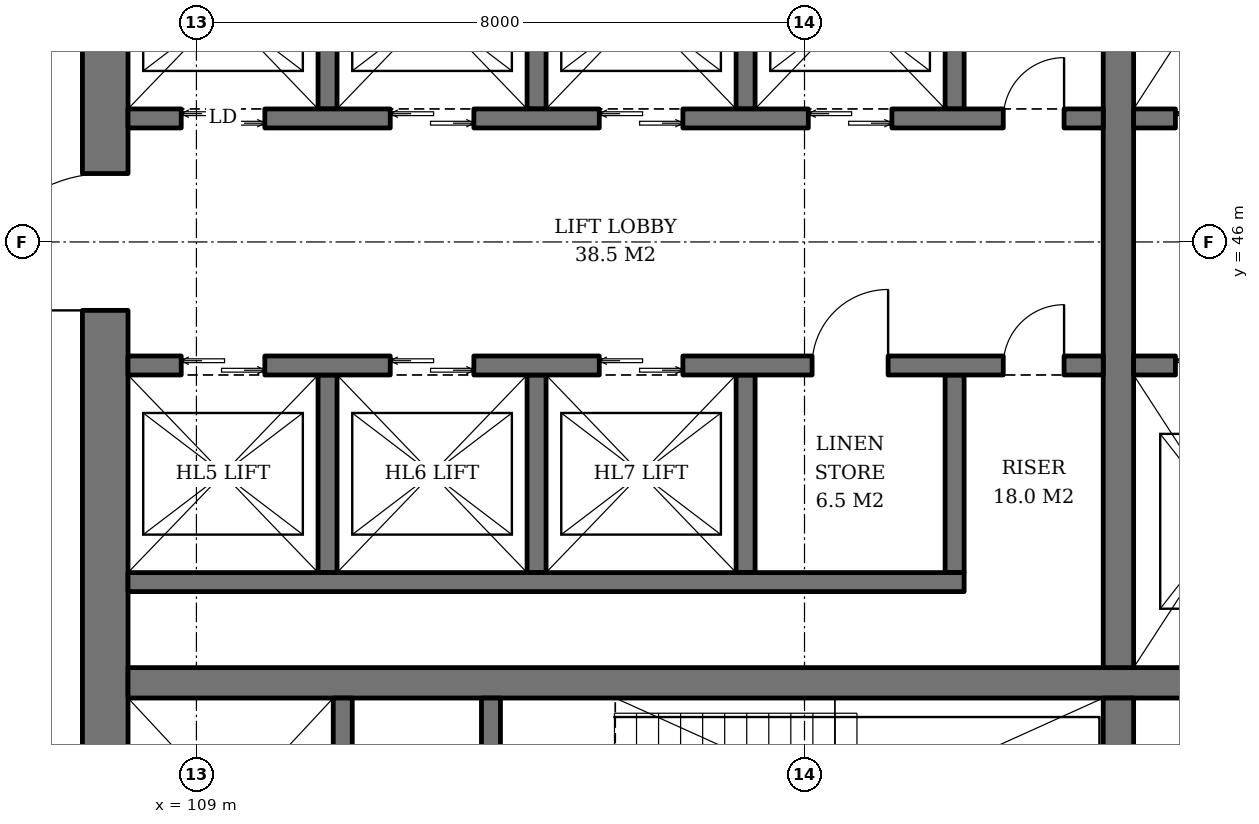
"""IFC4 building model, lengths in metres.
Left out: names, types, materials, properties, quantities, classifications, styles, units other than length and angle.
Written with IfcOpenShell. Run it as: python <this file> out.ifc"""

import sys

from ifc_helpers import new_model, si_unit, direction, frame, frame_2d, origin, place, context, subcontext, project, spatial, rectangle, extrude, element, fill, save


model = new_model("IFC4")
c1 = context("Model", 3, precision=1e-05, world=origin(), true_north=direction((0.0, 1.0)))
c2 = subcontext(c1, "Body", "Model", "MODEL_VIEW")
j1 = project(units=[si_unit("LENGTHUNIT", "METRE"), si_unit("PLANEANGLEUNIT", "RADIAN")], contexts=[c1])
p1 = place(None, origin())
s1 = spatial("IfcSite", under=j1, at=p1, CompositionType="ELEMENT")
p2 = place(p1, origin())
s2 = spatial("IfcBuilding", under=s1, at=p2, CompositionType="ELEMENT")
p3 = place(p2, frame((0.0, 0.0, 116.0)))
s3 = spatial("IfcBuildingStorey", under=s2, at=p3, CompositionType="ELEMENT", Elevation=116.0)
p4 = place(p3, frame((107.8, 37.1, 0.0), z_axis=(0.0, 0.0, 1.0), x_axis=(0.0, 1.0, 0.0)))
e1 = element("IfcWall", 1, at=p4, inside=s3, PredefinedType="SHEAR", context=c2, shape_type="SweptSolid", body=[
    extrude(rectangle(XDim=17.8, YDim=0.6, at=frame_2d((8.9, 0.0))), origin(), (0.0, 0.0, 1.0), 3.8),
])
p5 = place(p4, frame((8.0, 0.0, 0.0)))
e2 = element("IfcOpeningElement", 2, at=p5, cuts=e1, PredefinedType="OPENING", context=c2, shape_type="SweptSolid", body=[
    extrude(rectangle(XDim=1.8, YDim=2.4, at=frame_2d((0.9, 1.2))), frame((0.0, 0.31, 0.0), z_axis=(0.0, -1.0, 0.0), x_axis=(1.0, 0.0, 0.0)), (0.0, 0.0, 1.0), 0.62),
])
p6 = place(p3, frame((108.1, 40.2, 0.0), z_axis=(0.0, 0.0, 1.0), x_axis=(1.0, 0.0, 0.0)))
e3 = element("IfcWall", 3, at=p6, inside=s3, PredefinedType="SHEAR", context=c2, shape_type="SweptSolid", body=[
    extrude(rectangle(XDim=17.8, YDim=0.4, at=frame_2d((8.9, 0.0))), origin(), (0.0, 0.0, 1.0), 3.8),
])
p7 = place(p3, frame((121.13, 37.1, 0.0), z_axis=(0.0, 0.0, 1.0), x_axis=(0.0, 1.0, 0.0)))
e4 = element("IfcWall", 4, at=p7, inside=s3, PredefinedType="SHEAR", context=c2, shape_type="SweptSolid", body=[
    extrude(rectangle(XDim=2.9, YDim=0.4, at=frame_2d((1.45, 0.0))), origin(), (0.0, 0.0, 1.0), 3.8),
])
p8 = place(p3, frame((121.13, 40.4, 0.0), z_axis=(0.0, 0.0, 1.0), x_axis=(0.0, 1.0, 0.0)))
e5 = element("IfcWall", 5, at=p8, inside=s3, PredefinedType="SHEAR", context=c2, shape_type="SweptSolid", body=[
    extrude(rectangle(XDim=11.2, YDim=0.4, at=frame_2d((5.6, 0.0))), origin(), (0.0, 0.0, 1.0), 3.8),
])
p9 = place(p3, frame((110.925, 37.1, 0.0), z_axis=(0.0, 0.0, 1.0), x_axis=(0.0, 1.0, 0.0)))
e6 = element("IfcWall", 6, at=p9, inside=s3, PredefinedType="SHEAR", context=c2, shape_type="SweptSolid", body=[
    extrude(rectangle(XDim=2.9, YDim=0.25, at=frame_2d((1.45, 0.0))), origin(), (0.0, 0.0, 1.0), 3.8),
])
p10 = place(p9, frame((0.8, 0.0, 0.0)))
e7 = element("IfcOpeningElement", 7, at=p10, cuts=e6, PredefinedType="OPENING", context=c2, shape_type="SweptSolid", body=[
    extrude(rectangle(XDim=1.3, YDim=2.2, at=frame_2d((0.65, 1.1))), frame((0.0, 0.135, 0.0), z_axis=(0.0, -1.0, 0.0), x_axis=(1.0, 0.0, 0.0)), (0.0, 0.0, 1.0), 0.27),
])
p11 = place(p3, frame((112.875, 37.1, 0.0), z_axis=(0.0, 0.0, 1.0), x_axis=(0.0, 1.0, 0.0)))
e8 = element("IfcWall", 8, at=p11, inside=s3, PredefinedType="SHEAR", context=c2, shape_type="SweptSolid", body=[
    extrude(rectangle(XDim=2.9, YDim=0.25, at=frame_2d((1.45, 0.0))), origin(), (0.0, 0.0, 1.0), 3.8),
])
p12 = place(p11, frame((0.75, 0.0, 0.0)))
e9 = element("IfcOpeningElement", 9, at=p12, cuts=e8, PredefinedType="OPENING", context=c2, shape_type="SweptSolid", body=[
    extrude(rectangle(XDim=1.2, YDim=2.1, at=frame_2d((0.6, 1.05))), frame((0.0, 0.135, 0.0), z_axis=(0.0, -1.0, 0.0), x_axis=(1.0, 0.0, 0.0)), (0.0, 0.0, 1.0), 0.27),
])
for number, where, z_axis, x_axis in (
    (10, (110.725, 47.75, 0.0), (0.0, 0.0, 1.0), (0.0, 1.0, 0.0)),
    (11, (113.475, 47.75, 0.0), (0.0, 0.0, 1.0), (0.0, 1.0, 0.0)),
    (12, (116.225, 47.75, 0.0), (0.0, 0.0, 1.0), (0.0, 1.0, 0.0)),
    (13, (118.975, 47.75, 0.0), (0.0, 0.0, 1.0), (0.0, 1.0, 0.0)),
):
    element("IfcWall", number, at=place(p3, frame(where, z_axis=z_axis, x_axis=x_axis)), inside=s3, PredefinedType="SHEAR", context=c2, shape_type="SweptSolid", body=[
        extrude(rectangle(XDim=2.6, YDim=0.25, at=frame_2d((1.3, 0.0))), origin(), (0.0, 0.0, 1.0), 3.8),
    ])
p13 = place(p3, frame((108.1, 47.625, 0.0), z_axis=(0.0, 0.0, 1.0), x_axis=(1.0, 0.0, 0.0)))
e14 = element("IfcWall", 14, at=p13, inside=s3, PredefinedType="SHEAR", context=c2, shape_type="SweptSolid", body=[
    extrude(rectangle(XDim=12.83, YDim=0.25, at=frame_2d((6.415, 0.0))), origin(), (0.0, 0.0, 1.0), 3.8),
])
p14 = place(p13, frame((0.7, 0.0, 0.0)))
e15 = element("IfcOpeningElement", 15, at=p14, cuts=e14, PredefinedType="OPENING", context=c2, shape_type="SweptSolid", body=[
    extrude(rectangle(XDim=1.1, YDim=2.2, at=frame_2d((0.55, 1.1))), frame((0.0, 0.135, 0.0), z_axis=(0.0, -1.0, 0.0), x_axis=(1.0, 0.0, 0.0)), (0.0, 0.0, 1.0), 0.27),
])
p15 = place(p13, frame((3.45, 0.0, 0.0)))
e16 = element("IfcOpeningElement", 16, at=p15, cuts=e14, PredefinedType="OPENING", context=c2, shape_type="SweptSolid", body=[
    extrude(rectangle(XDim=1.1, YDim=2.2, at=frame_2d((0.55, 1.1))), frame((0.0, 0.135, 0.0), z_axis=(0.0, -1.0, 0.0), x_axis=(1.0, 0.0, 0.0)), (0.0, 0.0, 1.0), 0.27),
])
p16 = place(p13, frame((6.2, 0.0, 0.0)))
e17 = element("IfcOpeningElement", 17, at=p16, cuts=e14, PredefinedType="OPENING", context=c2, shape_type="SweptSolid", body=[
    extrude(rectangle(XDim=1.1, YDim=2.2, at=frame_2d((0.55, 1.1))), frame((0.0, 0.135, 0.0), z_axis=(0.0, -1.0, 0.0), x_axis=(1.0, 0.0, 0.0)), (0.0, 0.0, 1.0), 0.27),
])
p17 = place(p13, frame((8.95, 0.0, 0.0)))
e18 = element("IfcOpeningElement", 18, at=p17, cuts=e14, PredefinedType="OPENING", context=c2, shape_type="SweptSolid", body=[
    extrude(rectangle(XDim=1.1, YDim=2.2, at=frame_2d((0.55, 1.1))), frame((0.0, 0.135, 0.0), z_axis=(0.0, -1.0, 0.0), x_axis=(1.0, 0.0, 0.0)), (0.0, 0.0, 1.0), 0.27),
])
p18 = place(p13, frame((11.515, 0.0, 0.0)))
e19 = element("IfcOpeningElement", 19, at=p18, cuts=e14, PredefinedType="OPENING", context=c2, shape_type="SweptSolid", body=[
    extrude(rectangle(XDim=0.8, YDim=2.0, at=frame_2d((0.4, 1.0))), frame((0.0, 0.135, 0.0), z_axis=(0.0, -1.0, 0.0), x_axis=(1.0, 0.0, 0.0)), (0.0, 0.0, 1.0), 0.27),
])
for number, where, z_axis, x_axis in (
    (20, (110.725, 44.25, 0.0), (0.0, 0.0, 1.0), (0.0, -1.0, 0.0)),
    (21, (113.475, 44.25, 0.0), (0.0, 0.0, 1.0), (0.0, -1.0, 0.0)),
    (22, (116.225, 44.25, 0.0), (0.0, 0.0, 1.0), (0.0, -1.0, 0.0)),
    (23, (118.975, 44.25, 0.0), (0.0, 0.0, 1.0), (0.0, -1.0, 0.0)),
):
    element("IfcWall", number, at=place(p3, frame(where, z_axis=z_axis, x_axis=x_axis)), inside=s3, PredefinedType="SHEAR", context=c2, shape_type="SweptSolid", body=[
        extrude(rectangle(XDim=2.6, YDim=0.25, at=frame_2d((1.3, 0.0))), origin(), (0.0, 0.0, 1.0), 3.8),
    ])
p19 = place(p3, frame((108.1, 41.525, 0.0), z_axis=(0.0, 0.0, 1.0), x_axis=(1.0, 0.0, 0.0)))
e24 = element("IfcWall", 24, at=p19, inside=s3, PredefinedType="SHEAR", context=c2, shape_type="SweptSolid", body=[
    extrude(rectangle(XDim=11.0, YDim=0.25, at=frame_2d((5.5, 0.0))), origin(), (0.0, 0.0, 1.0), 3.8),
])
p20 = place(p3, frame((108.1, 44.375, 0.0), z_axis=(0.0, 0.0, 1.0), x_axis=(1.0, 0.0, 0.0)))
e25 = element("IfcWall", 25, at=p20, inside=s3, PredefinedType="SHEAR", context=c2, shape_type="SweptSolid", body=[
    extrude(rectangle(XDim=12.83, YDim=0.25, at=frame_2d((6.415, 0.0))), origin(), (0.0, 0.0, 1.0), 3.8),
])
p21 = place(p20, frame((0.7, 0.0, 0.0)))
e26 = element("IfcOpeningElement", 26, at=p21, cuts=e25, PredefinedType="OPENING", context=c2, shape_type="SweptSolid", body=[
    extrude(rectangle(XDim=1.1, YDim=2.2, at=frame_2d((0.55, 1.1))), frame((0.0, 0.135, 0.0), z_axis=(0.0, -1.0, 0.0), x_axis=(1.0, 0.0, 0.0)), (0.0, 0.0, 1.0), 0.27),
])
p22 = place(p20, frame((3.45, 0.0, 0.0)))
e27 = element("IfcOpeningElement", 27, at=p22, cuts=e25, PredefinedType="OPENING", context=c2, shape_type="SweptSolid", body=[
    extrude(rectangle(XDim=1.1, YDim=2.2, at=frame_2d((0.55, 1.1))), frame((0.0, 0.135, 0.0), z_axis=(0.0, -1.0, 0.0), x_axis=(1.0, 0.0, 0.0)), (0.0, 0.0, 1.0), 0.27),
])
p23 = place(p20, frame((6.2, 0.0, 0.0)))
e28 = element("IfcOpeningElement", 28, at=p23, cuts=e25, PredefinedType="OPENING", context=c2, shape_type="SweptSolid", body=[
    extrude(rectangle(XDim=1.1, YDim=2.2, at=frame_2d((0.55, 1.1))), frame((0.0, 0.135, 0.0), z_axis=(0.0, -1.0, 0.0), x_axis=(1.0, 0.0, 0.0)), (0.0, 0.0, 1.0), 0.27),
])
p24 = place(p20, frame((9.0, 0.0, 0.0)))
e29 = element("IfcOpeningElement", 29, at=p24, cuts=e25, PredefinedType="OPENING", context=c2, shape_type="SweptSolid", body=[
    extrude(rectangle(XDim=1.0, YDim=2.1, at=frame_2d((0.5, 1.05))), frame((0.0, 0.135, 0.0), z_axis=(0.0, -1.0, 0.0), x_axis=(1.0, 0.0, 0.0)), (0.0, 0.0, 1.0), 0.27),
])
p25 = place(p20, frame((11.515, 0.0, 0.0)))
e30 = element("IfcOpeningElement", 30, at=p25, cuts=e25, PredefinedType="OPENING", context=c2, shape_type="SweptSolid", body=[
    extrude(rectangle(XDim=0.8, YDim=2.0, at=frame_2d((0.4, 1.0))), frame((0.0, 0.135, 0.0), z_axis=(0.0, -1.0, 0.0), x_axis=(1.0, 0.0, 0.0)), (0.0, 0.0, 1.0), 0.27),
])
p26 = place(p3, frame((121.33, 47.625, 0.0), z_axis=(0.0, 0.0, 1.0), x_axis=(1.0, 0.0, 0.0)))
e31 = element("IfcWall", 31, at=p26, inside=s3, PredefinedType="SHEAR", context=c2, shape_type="SweptSolid", body=[
    extrude(rectangle(XDim=4.57, YDim=0.25, at=frame_2d((2.285, 0.0))), origin(), (0.0, 0.0, 1.0), 3.8),
])
p27 = place(p26, frame((0.55, 0.0, 0.0)))
e32 = element("IfcOpeningElement", 32, at=p27, cuts=e31, PredefinedType="OPENING", context=c2, shape_type="SweptSolid", body=[
    extrude(rectangle(XDim=1.4, YDim=2.4, at=frame_2d((0.7, 1.2))), frame((0.0, 0.135, 0.0), z_axis=(0.0, -1.0, 0.0), x_axis=(1.0, 0.0, 0.0)), (0.0, 0.0, 1.0), 0.27),
])
p28 = place(p26, frame((3.26, 0.0, 0.0)))
e33 = element("IfcOpeningElement", 33, at=p28, cuts=e31, PredefinedType="OPENING", context=c2, shape_type="SweptSolid", body=[
    extrude(rectangle(XDim=0.8, YDim=2.0, at=frame_2d((0.4, 1.0))), frame((0.0, 0.135, 0.0), z_axis=(0.0, -1.0, 0.0), x_axis=(1.0, 0.0, 0.0)), (0.0, 0.0, 1.0), 0.27),
])
p29 = place(p3, frame((121.33, 44.375, 0.0), z_axis=(0.0, 0.0, 1.0), x_axis=(1.0, 0.0, 0.0)))
e34 = element("IfcWall", 34, at=p29, inside=s3, PredefinedType="SHEAR", context=c2, shape_type="SweptSolid", body=[
    extrude(rectangle(XDim=4.57, YDim=0.25, at=frame_2d((2.285, 0.0))), origin(), (0.0, 0.0, 1.0), 3.8),
])
p30 = place(p29, frame((0.55, 0.0, 0.0)))
e35 = element("IfcOpeningElement", 35, at=p30, cuts=e34, PredefinedType="OPENING", context=c2, shape_type="SweptSolid", body=[
    extrude(rectangle(XDim=1.4, YDim=2.4, at=frame_2d((0.7, 1.2))), frame((0.0, 0.135, 0.0), z_axis=(0.0, -1.0, 0.0), x_axis=(1.0, 0.0, 0.0)), (0.0, 0.0, 1.0), 0.27),
])
p31 = place(p29, frame((3.26, 0.0, 0.0)))
e36 = element("IfcOpeningElement", 36, at=p31, cuts=e34, PredefinedType="OPENING", context=c2, shape_type="SweptSolid", body=[
    extrude(rectangle(XDim=0.8, YDim=2.0, at=frame_2d((0.4, 1.0))), frame((0.0, 0.135, 0.0), z_axis=(0.0, -1.0, 0.0), x_axis=(1.0, 0.0, 0.0)), (0.0, 0.0, 1.0), 0.27),
])
p32 = place(p14, origin())
e37 = element("IfcDoor", 37, at=p32, inside=s3, OperationType="DOUBLE_DOOR_SLIDING", PredefinedType="DOOR", context=c2, shape_type="SweptSolid", body=[
    extrude(rectangle(XDim=1.1, YDim=2.2, at=frame_2d((0.55, 1.1))), frame((0.0, 0.025, 0.0), z_axis=(0.0, -1.0, 0.0), x_axis=(1.0, 0.0, 0.0)), (0.0, 0.0, 1.0), 0.05),
])
fill(e15, e37)
p33 = place(p15, origin())
e38 = element("IfcDoor", 38, at=p33, inside=s3, OperationType="DOUBLE_DOOR_SLIDING", PredefinedType="DOOR", context=c2, shape_type="SweptSolid", body=[
    extrude(rectangle(XDim=1.1, YDim=2.2, at=frame_2d((0.55, 1.1))), frame((0.0, 0.025, 0.0), z_axis=(0.0, -1.0, 0.0), x_axis=(1.0, 0.0, 0.0)), (0.0, 0.0, 1.0), 0.05),
])
fill(e16, e38)
p34 = place(p16, origin())
e39 = element("IfcDoor", 39, at=p34, inside=s3, OperationType="DOUBLE_DOOR_SLIDING", PredefinedType="DOOR", context=c2, shape_type="SweptSolid", body=[
    extrude(rectangle(XDim=1.1, YDim=2.2, at=frame_2d((0.55, 1.1))), frame((0.0, 0.025, 0.0), z_axis=(0.0, -1.0, 0.0), x_axis=(1.0, 0.0, 0.0)), (0.0, 0.0, 1.0), 0.05),
])
fill(e17, e39)
p35 = place(p17, origin())
e40 = element("IfcDoor", 40, at=p35, inside=s3, OperationType="DOUBLE_DOOR_SLIDING", PredefinedType="DOOR", context=c2, shape_type="SweptSolid", body=[
    extrude(rectangle(XDim=1.1, YDim=2.2, at=frame_2d((0.55, 1.1))), frame((0.0, 0.025, 0.0), z_axis=(0.0, -1.0, 0.0), x_axis=(1.0, 0.0, 0.0)), (0.0, 0.0, 1.0), 0.05),
])
fill(e18, e40)
p36 = place(p18, origin())
e41 = element("IfcDoor", 41, at=p36, inside=s3, OperationType="SINGLE_SWING_RIGHT", PredefinedType="DOOR", context=c2, shape_type="SweptSolid", body=[
    extrude(rectangle(XDim=0.8, YDim=2.0, at=frame_2d((0.4, 1.0))), frame((0.0, 0.025, 0.0), z_axis=(0.0, -1.0, 0.0), x_axis=(1.0, 0.0, 0.0)), (0.0, 0.0, 1.0), 0.05),
])
fill(e19, e41)
p37 = place(p21, origin())
e42 = element("IfcDoor", 42, at=p37, inside=s3, OperationType="DOUBLE_DOOR_SLIDING", PredefinedType="DOOR", context=c2, shape_type="SweptSolid", body=[
    extrude(rectangle(XDim=1.1, YDim=2.2, at=frame_2d((0.55, 1.1))), frame((0.0, 0.025, 0.0), z_axis=(0.0, -1.0, 0.0), x_axis=(1.0, 0.0, 0.0)), (0.0, 0.0, 1.0), 0.05),
])
fill(e26, e42)
p38 = place(p22, origin())
e43 = element("IfcDoor", 43, at=p38, inside=s3, OperationType="DOUBLE_DOOR_SLIDING", PredefinedType="DOOR", context=c2, shape_type="SweptSolid", body=[
    extrude(rectangle(XDim=1.1, YDim=2.2, at=frame_2d((0.55, 1.1))), frame((0.0, 0.025, 0.0), z_axis=(0.0, -1.0, 0.0), x_axis=(1.0, 0.0, 0.0)), (0.0, 0.0, 1.0), 0.05),
])
fill(e27, e43)
p39 = place(p23, origin())
e44 = element("IfcDoor", 44, at=p39, inside=s3, OperationType="DOUBLE_DOOR_SLIDING", PredefinedType="DOOR", context=c2, shape_type="SweptSolid", body=[
    extrude(rectangle(XDim=1.1, YDim=2.2, at=frame_2d((0.55, 1.1))), frame((0.0, 0.025, 0.0), z_axis=(0.0, -1.0, 0.0), x_axis=(1.0, 0.0, 0.0)), (0.0, 0.0, 1.0), 0.05),
])
fill(e28, e44)
p40 = place(p24, origin())
e45 = element("IfcDoor", 45, at=p40, inside=s3, OperationType="SINGLE_SWING_RIGHT", PredefinedType="DOOR", context=c2, shape_type="SweptSolid", body=[
    extrude(rectangle(XDim=1.0, YDim=2.1, at=frame_2d((0.5, 1.05))), frame((0.0, 0.025, 0.0), z_axis=(0.0, -1.0, 0.0), x_axis=(1.0, 0.0, 0.0)), (0.0, 0.0, 1.0), 0.05),
])
fill(e29, e45)
p41 = place(p25, origin())
e46 = element("IfcDoor", 46, at=p41, inside=s3, OperationType="SINGLE_SWING_RIGHT", PredefinedType="DOOR", context=c2, shape_type="SweptSolid", body=[
    extrude(rectangle(XDim=0.8, YDim=2.0, at=frame_2d((0.4, 1.0))), frame((0.0, 0.025, 0.0), z_axis=(0.0, -1.0, 0.0), x_axis=(1.0, 0.0, 0.0)), (0.0, 0.0, 1.0), 0.05),
])
fill(e30, e46)
p42 = place(p27, origin())
e47 = element("IfcDoor", 47, at=p42, inside=s3, OperationType="DOUBLE_DOOR_SLIDING", PredefinedType="DOOR", context=c2, shape_type="SweptSolid", body=[
    extrude(rectangle(XDim=1.4, YDim=2.4, at=frame_2d((0.7, 1.2))), frame((0.0, 0.025, 0.0), z_axis=(0.0, -1.0, 0.0), x_axis=(1.0, 0.0, 0.0)), (0.0, 0.0, 1.0), 0.05),
])
fill(e32, e47)
p43 = place(p30, origin())
e48 = element("IfcDoor", 48, at=p43, inside=s3, OperationType="DOUBLE_DOOR_SLIDING", PredefinedType="DOOR", context=c2, shape_type="SweptSolid", body=[
    extrude(rectangle(XDim=1.4, YDim=2.4, at=frame_2d((0.7, 1.2))), frame((0.0, 0.025, 0.0), z_axis=(0.0, -1.0, 0.0), x_axis=(1.0, 0.0, 0.0)), (0.0, 0.0, 1.0), 0.05),
])
fill(e35, e48)
p44 = place(p5, origin())
e49 = element("IfcDoor", 49, at=p44, inside=s3, OperationType="DOUBLE_DOOR_SINGLE_SWING", PredefinedType="DOOR", context=c2, shape_type="SweptSolid", body=[
    extrude(rectangle(XDim=1.8, YDim=2.4, at=frame_2d((0.9, 1.2))), frame((0.0, 0.025, 0.0), z_axis=(0.0, -1.0, 0.0), x_axis=(1.0, 0.0, 0.0)), (0.0, 0.0, 1.0), 0.05),
])
fill(e2, e49)
save(model, sys.argv[1])
